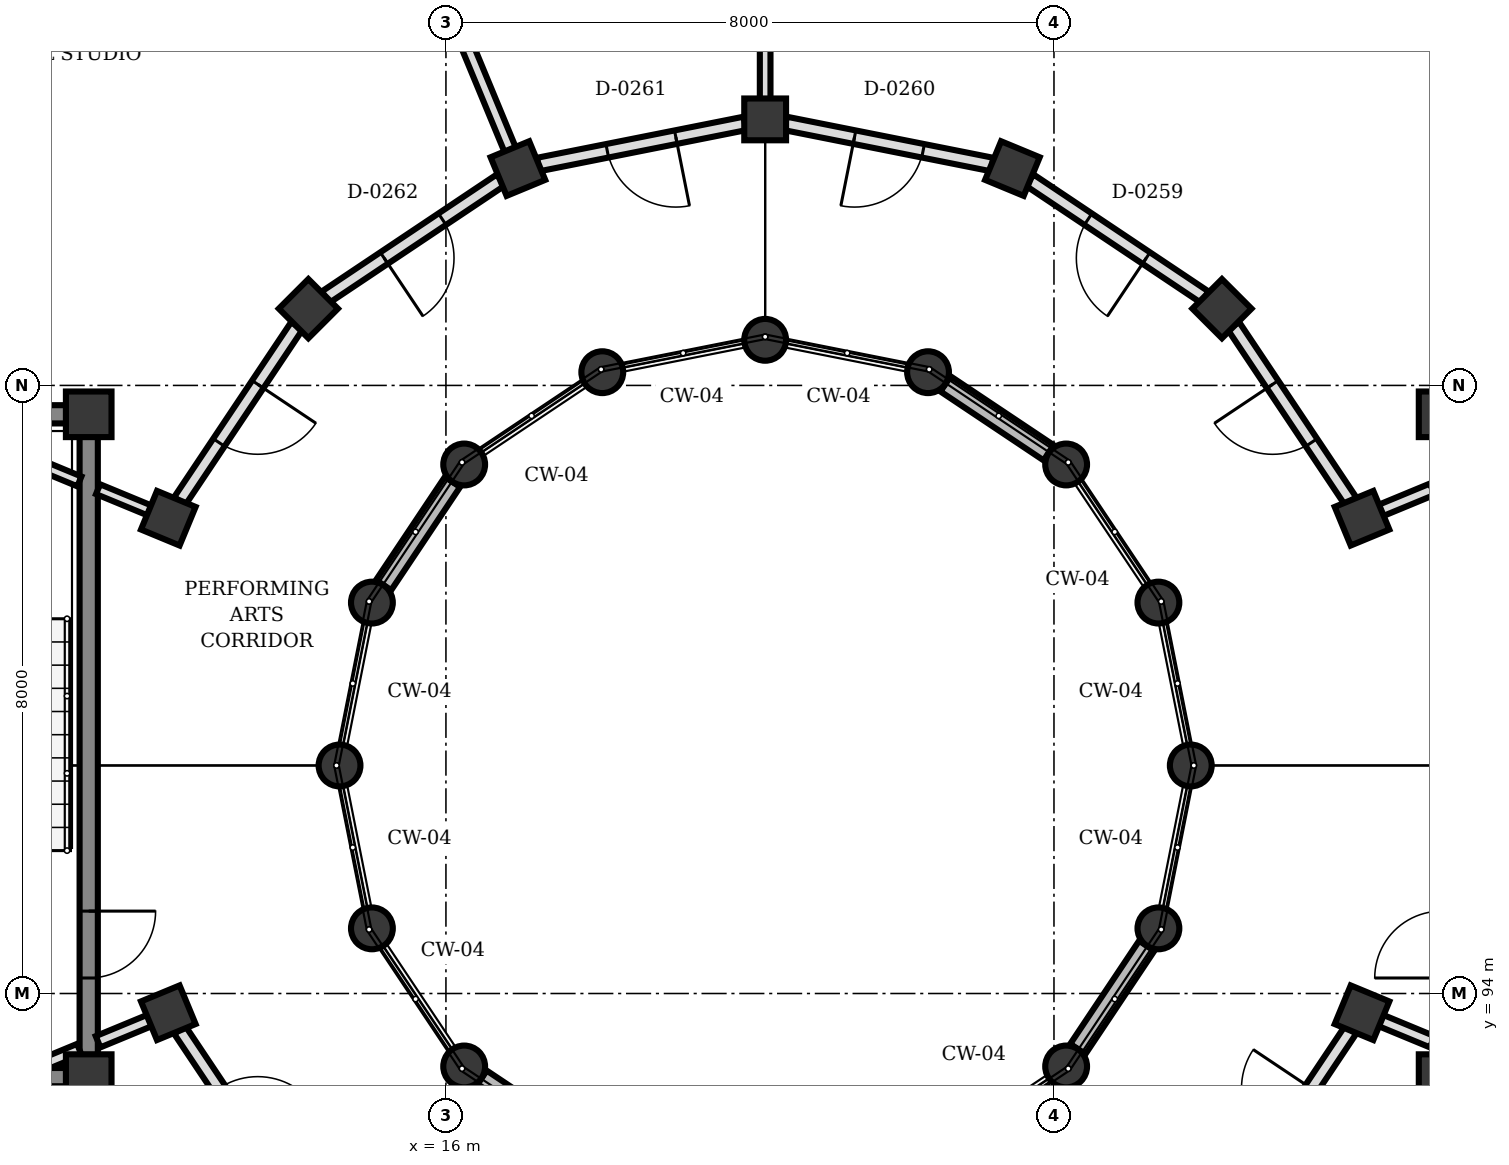
"""IFC4 building model, lengths in metres.
Left out: names, types, materials, properties, quantities, classifications, styles, units other than length and angle.
Written with IfcOpenShell. Run it as: python <this file> out.ifc"""

import sys

from ifc_helpers import new_model, si_unit, direction, frame, frame_2d, origin, origin_2d, place, context, subcontext, project, spatial, rectangle, circle, extrude, element, fill, save


model = new_model("IFC4")
c1 = context("Model", 3, precision=1e-05, world=origin(), true_north=direction((0.0, 1.0)))
c2 = subcontext(c1, "Body", "Model", "MODEL_VIEW")
j1 = project(units=[si_unit("LENGTHUNIT", "METRE"), si_unit("PLANEANGLEUNIT", "RADIAN")], contexts=[c1])
p1 = place(None, origin())
s1 = spatial("IfcSite", under=j1, at=p1, CompositionType="ELEMENT")
p2 = place(p1, origin())
s2 = spatial("IfcBuilding", under=s1, at=p2, CompositionType="ELEMENT")
p3 = place(p2, frame((0.0, 0.0, 8.5)))
s3 = spatial("IfcBuildingStorey", under=s2, at=p3, CompositionType="ELEMENT", Elevation=8.5)
for number, where, z_axis, x_axis in (
    (1, (11.3, 92.9, 0.0), (0.0, 0.0, 1.0), (1.0, 0.0, 0.0)),
    (2, (11.3, 101.62, 0.0), (0.0, 0.0, 1.0), (1.0, 0.0, 0.0)),
    (3, (29.1, 92.9, 0.0), (0.0, 0.0, 1.0), (1.0, 0.0, 0.0)),
    (4, (29.1, 101.62, 0.0), (0.0, 0.0, 1.0), (1.0, 0.0, 0.0)),
):
    element("IfcColumn", number, at=place(p3, frame(where, z_axis=z_axis, x_axis=x_axis)), inside=s3, PredefinedType="COLUMN", context=c2, shape_type="SweptSolid", body=[
        extrude(rectangle(XDim=0.6, YDim=0.6, at=origin_2d()), origin(), (0.0, 0.0, 1.0), 4.0),
    ])
for number, where, z_axis, x_axis in (
    (5, (25.8, 97.0, 0.0), (0.0, 0.0, 1.0), (1.0, 0.0, 0.0)),
    (6, (25.374, 99.143, 0.0), (0.0, 0.0, 1.0), (1.0, 0.0, 0.0)),
    (7, (24.16, 100.96, 0.0), (0.0, 0.0, 1.0), (1.0, 0.0, 0.0)),
    (8, (22.343, 102.174, 0.0), (0.0, 0.0, 1.0), (1.0, 0.0, 0.0)),
    (9, (20.2, 102.6, 0.0), (0.0, 0.0, 1.0), (1.0, 0.0, 0.0)),
    (10, (18.057, 102.174, 0.0), (0.0, 0.0, 1.0), (1.0, 0.0, 0.0)),
    (11, (16.24, 100.96, 0.0), (0.0, 0.0, 1.0), (1.0, 0.0, 0.0)),
    (12, (15.026, 99.143, 0.0), (0.0, 0.0, 1.0), (1.0, 0.0, 0.0)),
    (13, (14.6, 97.0, 0.0), (0.0, 0.0, 1.0), (1.0, 0.0, 0.0)),
    (14, (15.026, 94.857, 0.0), (0.0, 0.0, 1.0), (1.0, 0.0, 0.0)),
    (15, (16.24, 93.04, 0.0), (0.0, 0.0, 1.0), (1.0, 0.0, 0.0)),
    (16, (24.16, 93.04, 0.0), (0.0, 0.0, 1.0), (1.0, 0.0, 0.0)),
    (17, (25.374, 94.857, 0.0), (0.0, 0.0, 1.0), (1.0, 0.0, 0.0)),
):
    element("IfcColumn", number, at=place(p3, frame(where, z_axis=z_axis, x_axis=x_axis)), inside=s3, PredefinedType="COLUMN", context=c2, shape_type="SweptSolid", body=[
        extrude(circle(Radius=0.275, at=origin_2d()), origin(), (0.0, 0.0, 1.0), 4.0),
    ])
for number, where, z_axis, x_axis in (
    (18, (28.053, 100.253, 0.0), (0.0, 0.0, 1.0), (0.924, 0.383, 0.0)),
    (19, (26.21, 103.01, 0.0), (0.0, 0.0, 1.0), (0.707, 0.707, 0.0)),
    (20, (23.453, 104.853, 0.0), (0.0, 0.0, 1.0), (0.383, 0.924, 0.0)),
    (21, (20.2, 105.5, 0.0), (0.0, 0.0, 1.0), (0.0, 1.0, 0.0)),
    (22, (16.947, 104.853, 0.0), (0.0, 0.0, 1.0), (-0.383, 0.924, 0.0)),
    (23, (14.19, 103.01, 0.0), (0.0, 0.0, 1.0), (-0.707, 0.707, 0.0)),
    (24, (12.347, 100.253, 0.0), (0.0, 0.0, 1.0), (-0.924, 0.383, 0.0)),
    (25, (12.347, 93.747, 0.0), (0.0, 0.0, 1.0), (-0.924, -0.383, 0.0)),
    (26, (28.053, 93.747, 0.0), (0.0, 0.0, 1.0), (0.924, -0.383, 0.0)),
):
    element("IfcColumn", number, at=place(p3, frame(where, z_axis=z_axis, x_axis=x_axis)), inside=s3, PredefinedType="COLUMN", context=c2, shape_type="SweptSolid", body=[
        extrude(rectangle(XDim=0.55, YDim=0.55, at=origin_2d()), origin(), (0.0, 0.0, 1.0), 4.0),
    ])
for number, where, z_axis, x_axis in (
    (27, (23.93, 101.114, 0.0), (0.0, 0.0, 1.0), (-0.832, 0.555, 0.0)),
    (28, (16.086, 100.73, 0.0), (0.0, 0.0, 1.0), (-0.555, -0.832, 0.0)),
    (29, (16.47, 92.886, 0.0), (0.0, 0.0, 1.0), (0.832, -0.555, 0.0)),
    (30, (24.314, 93.27, 0.0), (0.0, 0.0, 1.0), (0.555, 0.832, 0.0)),
):
    element("IfcWall", number, at=place(p3, frame(where, z_axis=z_axis, x_axis=x_axis)), inside=s3, PredefinedType="SOLIDWALL", context=c2, shape_type="SweptSolid", body=[
        extrude(rectangle(XDim=1.632, YDim=0.24, at=frame_2d((0.816, 0.0))), origin(), (0.0, 0.0, 1.0), 3.222),
    ])
p4 = place(p3, frame((11.3, 101.328, 0.0), z_axis=(0.0, 0.0, 1.0), x_axis=(0.0, -1.0, 0.0)))
e31 = element("IfcWall", 31, at=p4, inside=s3, PredefinedType="SHEAR", context=c2, shape_type="SweptSolid", body=[
    extrude(rectangle(XDim=8.136, YDim=0.24, at=frame_2d((4.068, 0.0))), origin(), (0.0, 0.0, 1.0), 3.74),
])
p5 = place(p4, frame((6.244, 0.0, 0.0)))
e32 = element("IfcOpeningElement", 32, at=p5, cuts=e31, PredefinedType="OPENING", context=c2, shape_type="SweptSolid", body=[
    extrude(rectangle(XDim=0.88, YDim=2.1, at=frame_2d((0.44, 1.05))), frame((0.0, 0.13, 0.0), z_axis=(0.0, -1.0, 0.0), x_axis=(1.0, 0.0, 0.0)), (0.0, 0.0, 1.0), 0.26),
])
for number, where, z_axis, x_axis in (
    (33, (11.008, 92.9, 0.0), (0.0, 0.0, 1.0), (-1.0, 0.0, 0.0)),
    (34, (11.008, 101.62, 0.0), (0.0, 0.0, 1.0), (-1.0, 0.0, 0.0)),
):
    element("IfcWall", number, at=place(p3, frame(where, z_axis=z_axis, x_axis=x_axis)), inside=s3, PredefinedType="SHEAR", context=c2, shape_type="SweptSolid", body=[
        extrude(rectangle(XDim=4.216, YDim=0.24, at=frame_2d((2.108, 0.0))), origin(), (0.0, 0.0, 1.0), 3.74),
    ])
p6 = place(p3, frame((28.3, 100.355, 0.0), z_axis=(0.0, 0.0, 1.0), x_axis=(0.924069600435, 0.382224245113, 0.0)))
e35 = element("IfcWall", 35, at=p6, inside=s3, PredefinedType="PARTITIONING", context=c2, shape_type="SweptSolid", body=[
    extrude(rectangle(XDim=0.733, YDim=0.16, at=frame_2d((0.366, 0.0))), origin(), (0.0, 0.0, 1.0), 3.7),
])
p7 = place(p3, frame((20.2, 105.767, 0.0), z_axis=(0.0, 0.0, 1.0), x_axis=(0.0, 1.0, 0.0)))
e36 = element("IfcWall", 36, at=p7, inside=s3, PredefinedType="PARTITIONING", context=c2, shape_type="SweptSolid", body=[
    extrude(rectangle(XDim=8.441, YDim=0.14, at=frame_2d((4.22, 0.0))), origin(), (0.0, 0.0, 1.0), 3.072),
])
p8 = place(p3, frame((16.845, 105.1, 0.0), z_axis=(0.0, 0.0, 1.0), x_axis=(-0.382683896966, 0.923879340067, 0.0)))
e37 = element("IfcWall", 37, at=p8, inside=s3, PredefinedType="PARTITIONING", context=c2, shape_type="SweptSolid", body=[
    extrude(rectangle(XDim=8.44, YDim=0.16, at=frame_2d((4.22, 0.0))), origin(), (0.0, 0.0, 1.0), 3.072),
])
p9 = place(p3, frame((12.1, 100.355, 0.0), z_axis=(0.0, 0.0, 1.0), x_axis=(-0.924069600435, 0.382224245113, 0.0)))
e38 = element("IfcWall", 38, at=p9, inside=s3, PredefinedType="PARTITIONING", context=c2, shape_type="SweptSolid", body=[
    extrude(rectangle(XDim=0.733, YDim=0.14, at=frame_2d((0.366, 0.0))), origin(), (0.0, 0.0, 1.0), 3.7),
])
p10 = place(p3, frame((11.177, 100.737, 0.0), z_axis=(0.0, 0.0, 1.0), x_axis=(-0.923817443679, 0.382833293686, 0.0)))
e39 = element("IfcWall", 39, at=p10, inside=s3, PredefinedType="PARTITIONING", context=c2, shape_type="SweptSolid", body=[
    extrude(rectangle(XDim=1.985, YDim=0.14, at=frame_2d((0.993, 0.0))), origin(), (0.0, 0.0, 1.0), 3.7),
])
p11 = place(p3, frame((12.1, 93.645, 0.0), z_axis=(0.0, 0.0, 1.0), x_axis=(-0.924069600435, -0.382224245113, 0.0)))
e40 = element("IfcWall", 40, at=p11, inside=s3, PredefinedType="PARTITIONING", context=c2, shape_type="SweptSolid", body=[
    extrude(rectangle(XDim=0.733, YDim=0.16, at=frame_2d((0.366, 0.0))), origin(), (0.0, 0.0, 1.0), 3.072),
])
p12 = place(p3, frame((11.177, 93.263, 0.0), z_axis=(0.0, 0.0, 1.0), x_axis=(-0.923812676193, -0.382844797933, 0.0)))
e41 = element("IfcWall", 41, at=p12, inside=s3, PredefinedType="PARTITIONING", context=c2, shape_type="SweptSolid", body=[
    extrude(rectangle(XDim=0.627, YDim=0.16, at=frame_2d((0.313, 0.0))), origin(), (0.0, 0.0, 1.0), 3.072),
])
p13 = place(p3, frame((28.3, 93.645, 0.0), z_axis=(0.0, 0.0, 1.0), x_axis=(0.924069600435, -0.382224245113, 0.0)))
e42 = element("IfcWall", 42, at=p13, inside=s3, PredefinedType="PARTITIONING", context=c2, shape_type="SweptSolid", body=[
    extrude(rectangle(XDim=0.733, YDim=0.16, at=frame_2d((0.366, 0.0))), origin(), (0.0, 0.0, 1.0), 3.072),
])
p14 = place(p3, frame((27.902, 100.479, 0.0), z_axis=(0.0, 0.0, 1.0), x_axis=(-0.555797002478, 0.831318045056, 0.0)))
e43 = element("IfcWall", 43, at=p14, inside=s3, PredefinedType="PARTITIONING", context=c2, shape_type="SweptSolid", body=[
    extrude(rectangle(XDim=2.773, YDim=0.18, at=frame_2d((1.386, 0.0))), origin(), (0.0, 0.0, 1.0), 3.072),
])
p15 = place(p14, frame((0.926, 0.0, 0.0)))
e44 = element("IfcOpeningElement", 44, at=p15, cuts=e43, PredefinedType="OPENING", context=c2, shape_type="SweptSolid", body=[
    extrude(rectangle(XDim=0.92, YDim=2.1, at=frame_2d((0.46, 1.05))), frame((0.0, 0.1, 0.0), z_axis=(0.0, -1.0, 0.0), x_axis=(1.0, 0.0, 0.0)), (0.0, 0.0, 1.0), 0.2),
])
p16 = place(p3, frame((25.984, 103.161, 0.0), z_axis=(0.0, 0.0, 1.0), x_axis=(-0.831318045056, 0.555797002478, 0.0)))
e45 = element("IfcWall", 45, at=p16, inside=s3, PredefinedType="PARTITIONING", context=c2, shape_type="SweptSolid", body=[
    extrude(rectangle(XDim=2.773, YDim=0.18, at=frame_2d((1.386, 0.0))), origin(), (0.0, 0.0, 1.0), 3.072),
])
p17 = place(p16, frame((0.926, 0.0, 0.0)))
e46 = element("IfcOpeningElement", 46, at=p17, cuts=e45, PredefinedType="OPENING", context=c2, shape_type="SweptSolid", body=[
    extrude(rectangle(XDim=0.92, YDim=2.1, at=frame_2d((0.46, 1.05))), frame((0.0, 0.1, 0.0), z_axis=(0.0, -1.0, 0.0), x_axis=(1.0, 0.0, 0.0)), (0.0, 0.0, 1.0), 0.2),
])
p18 = place(p3, frame((23.186, 104.906, 0.0), z_axis=(0.0, 0.0, 1.0), x_axis=(-0.980773264811, 0.195150718759, 0.0)))
e47 = element("IfcWall", 47, at=p18, inside=s3, PredefinedType="PARTITIONING", context=c2, shape_type="SweptSolid", body=[
    extrude(rectangle(XDim=2.772, YDim=0.18, at=frame_2d((1.386, 0.0))), origin(), (0.0, 0.0, 1.0), 3.072),
])
p19 = place(p18, frame((0.926, 0.0, 0.0)))
e48 = element("IfcOpeningElement", 48, at=p19, cuts=e47, PredefinedType="OPENING", context=c2, shape_type="SweptSolid", body=[
    extrude(rectangle(XDim=0.92, YDim=2.1, at=frame_2d((0.46, 1.05))), frame((0.0, 0.1, 0.0), z_axis=(0.0, -1.0, 0.0), x_axis=(1.0, 0.0, 0.0)), (0.0, 0.0, 1.0), 0.2),
])
p20 = place(p3, frame((19.933, 105.447, 0.0), z_axis=(0.0, 0.0, 1.0), x_axis=(-0.980773264811, -0.195150718759, 0.0)))
e49 = element("IfcWall", 49, at=p20, inside=s3, PredefinedType="PARTITIONING", context=c2, shape_type="SweptSolid", body=[
    extrude(rectangle(XDim=2.772, YDim=0.18, at=frame_2d((1.386, 0.0))), origin(), (0.0, 0.0, 1.0), 3.072),
])
p21 = place(p20, frame((0.926, 0.0, 0.0)))
e50 = element("IfcOpeningElement", 50, at=p21, cuts=e49, PredefinedType="OPENING", context=c2, shape_type="SweptSolid", body=[
    extrude(rectangle(XDim=0.92, YDim=2.1, at=frame_2d((0.46, 1.05))), frame((0.0, 0.1, 0.0), z_axis=(0.0, -1.0, 0.0), x_axis=(1.0, 0.0, 0.0)), (0.0, 0.0, 1.0), 0.2),
])
p22 = place(p3, frame((16.721, 104.702, 0.0), z_axis=(0.0, 0.0, 1.0), x_axis=(-0.831318045056, -0.555797002478, 0.0)))
e51 = element("IfcWall", 51, at=p22, inside=s3, PredefinedType="PARTITIONING", context=c2, shape_type="SweptSolid", body=[
    extrude(rectangle(XDim=2.773, YDim=0.18, at=frame_2d((1.386, 0.0))), origin(), (0.0, 0.0, 1.0), 3.072),
])
p23 = place(p22, frame((0.926, 0.0, 0.0)))
e52 = element("IfcOpeningElement", 52, at=p23, cuts=e51, PredefinedType="OPENING", context=c2, shape_type="SweptSolid", body=[
    extrude(rectangle(XDim=0.92, YDim=2.1, at=frame_2d((0.46, 1.05))), frame((0.0, 0.1, 0.0), z_axis=(0.0, -1.0, 0.0), x_axis=(1.0, 0.0, 0.0)), (0.0, 0.0, 1.0), 0.2),
])
p24 = place(p3, frame((14.039, 102.784, 0.0), z_axis=(0.0, 0.0, 1.0), x_axis=(-0.555797002478, -0.831318045056, 0.0)))
e53 = element("IfcWall", 53, at=p24, inside=s3, PredefinedType="PARTITIONING", context=c2, shape_type="SweptSolid", body=[
    extrude(rectangle(XDim=2.773, YDim=0.18, at=frame_2d((1.386, 0.0))), origin(), (0.0, 0.0, 1.0), 3.072),
])
p25 = place(p24, frame((0.926, 0.0, 0.0)))
e54 = element("IfcOpeningElement", 54, at=p25, cuts=e53, PredefinedType="OPENING", context=c2, shape_type="SweptSolid", body=[
    extrude(rectangle(XDim=0.92, YDim=2.1, at=frame_2d((0.46, 1.05))), frame((0.0, 0.1, 0.0), z_axis=(0.0, -1.0, 0.0), x_axis=(1.0, 0.0, 0.0)), (0.0, 0.0, 1.0), 0.2),
])
p26 = place(p3, frame((12.498, 93.521, 0.0), z_axis=(0.0, 0.0, 1.0), x_axis=(0.555797002478, -0.831318045056, 0.0)))
e55 = element("IfcWall", 55, at=p26, inside=s3, PredefinedType="PARTITIONING", context=c2, shape_type="SweptSolid", body=[
    extrude(rectangle(XDim=2.773, YDim=0.18, at=frame_2d((1.386, 0.0))), origin(), (0.0, 0.0, 1.0), 3.072),
])
p27 = place(p26, frame((0.926, 0.0, 0.0)))
e56 = element("IfcOpeningElement", 56, at=p27, cuts=e55, PredefinedType="OPENING", context=c2, shape_type="SweptSolid", body=[
    extrude(rectangle(XDim=0.92, YDim=2.1, at=frame_2d((0.46, 1.05))), frame((0.0, 0.1, 0.0), z_axis=(0.0, -1.0, 0.0), x_axis=(1.0, 0.0, 0.0)), (0.0, 0.0, 1.0), 0.2),
])
p28 = place(p3, frame((26.361, 91.216, 0.0), z_axis=(0.0, 0.0, 1.0), x_axis=(0.555797002478, 0.831318045056, 0.0)))
e57 = element("IfcWall", 57, at=p28, inside=s3, PredefinedType="PARTITIONING", context=c2, shape_type="SweptSolid", body=[
    extrude(rectangle(XDim=2.773, YDim=0.18, at=frame_2d((1.386, 0.0))), origin(), (0.0, 0.0, 1.0), 3.072),
])
p29 = place(p28, frame((0.926, 0.0, 0.0)))
e58 = element("IfcOpeningElement", 58, at=p29, cuts=e57, PredefinedType="OPENING", context=c2, shape_type="SweptSolid", body=[
    extrude(rectangle(XDim=0.92, YDim=2.1, at=frame_2d((0.46, 1.05))), frame((0.0, 0.1, 0.0), z_axis=(0.0, -1.0, 0.0), x_axis=(1.0, 0.0, 0.0)), (0.0, 0.0, 1.0), 0.2),
])
p30 = place(p5, origin())
e59 = element("IfcDoor", 59, at=p30, inside=s3, OperationType="SINGLE_SWING_LEFT", PredefinedType="DOOR", context=c2, shape_type="SweptSolid", body=[
    extrude(rectangle(XDim=0.88, YDim=2.1, at=frame_2d((0.44, 1.05))), frame((0.0, 0.025, 0.0), z_axis=(0.0, -1.0, 0.0), x_axis=(1.0, 0.0, 0.0)), (0.0, 0.0, 1.0), 0.05),
])
fill(e32, e59)
p31 = place(p15, origin())
e60 = element("IfcDoor", 60, at=p31, inside=s3, OperationType="SINGLE_SWING_RIGHT", PredefinedType="DOOR", context=c2, shape_type="SweptSolid", body=[
    extrude(rectangle(XDim=0.92, YDim=2.1, at=frame_2d((0.46, 1.05))), frame((0.0, 0.025, 0.0), z_axis=(0.0, -1.0, 0.0), x_axis=(1.0, 0.0, 0.0)), (0.0, 0.0, 1.0), 0.05),
])
fill(e44, e60)
p32 = place(p17, origin())
e61 = element("IfcDoor", 61, at=p32, inside=s3, OperationType="SINGLE_SWING_LEFT", PredefinedType="DOOR", context=c2, shape_type="SweptSolid", body=[
    extrude(rectangle(XDim=0.92, YDim=2.1, at=frame_2d((0.46, 1.05))), frame((0.0, 0.025, 0.0), z_axis=(0.0, -1.0, 0.0), x_axis=(1.0, 0.0, 0.0)), (0.0, 0.0, 1.0), 0.05),
])
fill(e46, e61)
p33 = place(p19, origin())
e62 = element("IfcDoor", 62, at=p33, inside=s3, OperationType="SINGLE_SWING_RIGHT", PredefinedType="DOOR", context=c2, shape_type="SweptSolid", body=[
    extrude(rectangle(XDim=0.92, YDim=2.1, at=frame_2d((0.46, 1.05))), frame((0.0, 0.025, 0.0), z_axis=(0.0, -1.0, 0.0), x_axis=(1.0, 0.0, 0.0)), (0.0, 0.0, 1.0), 0.05),
])
fill(e48, e62)
p34 = place(p21, origin())
e63 = element("IfcDoor", 63, at=p34, inside=s3, OperationType="SINGLE_SWING_LEFT", PredefinedType="DOOR", context=c2, shape_type="SweptSolid", body=[
    extrude(rectangle(XDim=0.92, YDim=2.1, at=frame_2d((0.46, 1.05))), frame((0.0, 0.025, 0.0), z_axis=(0.0, -1.0, 0.0), x_axis=(1.0, 0.0, 0.0)), (0.0, 0.0, 1.0), 0.05),
])
fill(e50, e63)
p35 = place(p23, origin())
e64 = element("IfcDoor", 64, at=p35, inside=s3, OperationType="SINGLE_SWING_RIGHT", PredefinedType="DOOR", context=c2, shape_type="SweptSolid", body=[
    extrude(rectangle(XDim=0.92, YDim=2.1, at=frame_2d((0.46, 1.05))), frame((0.0, 0.025, 0.0), z_axis=(0.0, -1.0, 0.0), x_axis=(1.0, 0.0, 0.0)), (0.0, 0.0, 1.0), 0.05),
])
fill(e52, e64)
p36 = place(p25, origin())
e65 = element("IfcDoor", 65, at=p36, inside=s3, OperationType="SINGLE_SWING_LEFT", PredefinedType="DOOR", context=c2, shape_type="SweptSolid", body=[
    extrude(rectangle(XDim=0.92, YDim=2.1, at=frame_2d((0.46, 1.05))), frame((0.0, 0.025, 0.0), z_axis=(0.0, -1.0, 0.0), x_axis=(1.0, 0.0, 0.0)), (0.0, 0.0, 1.0), 0.05),
])
fill(e54, e65)
save(model, sys.argv[1])
